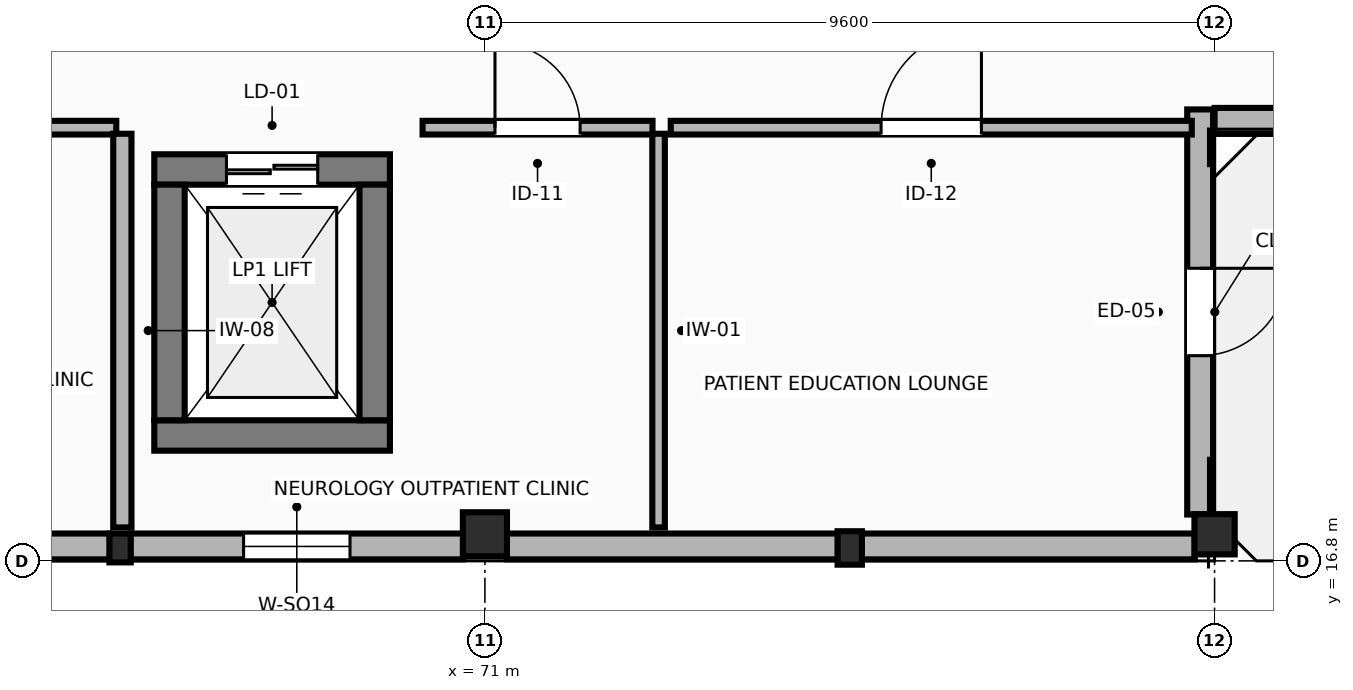
"""IFC4 building model, lengths in metres.
Left out: names, types, materials, properties, quantities, classifications, styles, units other than length and angle.
Written with IfcOpenShell. Run it as: python <this file> out.ifc"""

import sys

from ifc_helpers import new_model, si_unit, direction, frame, frame_2d, origin, origin_2d, place, context, subcontext, project, spatial, rectangle, extrude, element, fill, save


model = new_model("IFC4")
c1 = context("Model", 3, precision=1e-05, world=origin(), true_north=direction((0.0, 1.0)))
c2 = subcontext(c1, "Body", "Model", "MODEL_VIEW")
j1 = project(units=[si_unit("LENGTHUNIT", "METRE"), si_unit("PLANEANGLEUNIT", "RADIAN")], contexts=[c1])
p1 = place(None, origin())
s1 = spatial("IfcSite", under=j1, at=p1, CompositionType="ELEMENT")
p2 = place(p1, origin())
s2 = spatial("IfcBuilding", under=s1, at=p2, CompositionType="ELEMENT")
p3 = place(p2, frame((0.0, 0.0, 9.6)))
s3 = spatial("IfcBuildingStorey", under=s2, at=p3, CompositionType="ELEMENT", Elevation=9.6)
p4 = place(p3, frame((71.0, 17.15, 0.0), z_axis=(0.0, 0.0, 1.0), x_axis=(1.0, 0.0, 0.0)))
e1 = element("IfcColumn", 1, at=p4, inside=s3, PredefinedType="COLUMN", context=c2, shape_type="SweptSolid", body=[
    extrude(rectangle(XDim=0.58, YDim=0.58, at=origin_2d()), origin(), (0.0, 0.0, 1.0), 4.2),
])
p5 = place(p3, frame((80.6, 17.15, 0.0), z_axis=(0.0, 0.0, 1.0), x_axis=(1.0, 0.0, 0.0)))
e2 = element("IfcColumn", 2, at=p5, inside=s3, PredefinedType="COLUMN", context=c2, shape_type="SweptSolid", body=[
    extrude(rectangle(XDim=0.53, YDim=0.53, at=origin_2d()), origin(), (0.0, 0.0, 1.0), 4.2),
])
p6 = place(p3, frame((66.2, 16.97, 0.0), z_axis=(0.0, 0.0, 1.0), x_axis=(1.0, 0.0, 0.0)))
e3 = element("IfcColumn", 3, at=p6, inside=s3, PredefinedType="PILASTER", context=c2, shape_type="SweptSolid", body=[
    extrude(rectangle(XDim=0.28, YDim=0.38, at=origin_2d()), origin(), (0.0, 0.0, 1.0), 4.2),
])
p7 = place(p3, frame((75.8, 16.97, 0.0), z_axis=(0.0, 0.0, 1.0), x_axis=(1.0, 0.0, 0.0)))
e4 = element("IfcColumn", 4, at=p7, inside=s3, PredefinedType="PILASTER", context=c2, shape_type="SweptSolid", body=[
    extrude(rectangle(XDim=0.32, YDim=0.44, at=origin_2d()), origin(), (0.0, 0.0, 1.0), 4.2),
])
p8 = place(p3, frame((61.58, 16.99, 0.0), z_axis=(0.0, 0.0, 1.0), x_axis=(1.0, 0.0, 0.0)))
e5 = element("IfcWall", 5, at=p8, inside=s3, PredefinedType="STANDARD", context=c2, shape_type="SweptSolid", body=[
    extrude(rectangle(XDim=4.485, YDim=0.34, at=frame_2d((2.242, 0.0))), origin(), (0.0, 0.0, 1.0), 3.185),
])
p9 = place(p8, frame((1.643, 0.0, 1.15)))
e6 = element("IfcOpeningElement", 6, at=p9, cuts=e5, PredefinedType="OPENING", context=c2, shape_type="SweptSolid", body=[
    extrude(rectangle(XDim=1.2, YDim=1.2, at=frame_2d((0.6, 0.6))), frame((0.0, 0.18, 0.0), z_axis=(0.0, -1.0, 0.0), x_axis=(1.0, 0.0, 0.0)), (0.0, 0.0, 1.0), 0.36),
])
p10 = place(p3, frame((66.335, 16.99, 0.0), z_axis=(0.0, 0.0, 1.0), x_axis=(1.0, 0.0, 0.0)))
e7 = element("IfcWall", 7, at=p10, inside=s3, PredefinedType="STANDARD", context=c2, shape_type="SweptSolid", body=[
    extrude(rectangle(XDim=4.38, YDim=0.34, at=frame_2d((2.19, 0.0))), origin(), (0.0, 0.0, 1.0), 3.185),
])
p11 = place(p10, frame((1.49, 0.0, 1.15)))
e8 = element("IfcOpeningElement", 8, at=p11, cuts=e7, PredefinedType="OPENING", context=c2, shape_type="SweptSolid", body=[
    extrude(rectangle(XDim=1.4, YDim=1.4, at=frame_2d((0.7, 0.7))), frame((0.0, 0.18, 0.0), z_axis=(0.0, -1.0, 0.0), x_axis=(1.0, 0.0, 0.0)), (0.0, 0.0, 1.0), 0.36),
])
p12 = place(p3, frame((71.285, 16.99, 0.0), z_axis=(0.0, 0.0, 1.0), x_axis=(1.0, 0.0, 0.0)))
e9 = element("IfcWall", 9, at=p12, inside=s3, PredefinedType="STANDARD", context=c2, shape_type="SweptSolid", body=[
    extrude(rectangle(XDim=4.36, YDim=0.34, at=frame_2d((2.18, 0.0))), origin(), (0.0, 0.0, 1.0), 3.185),
])
p13 = place(p3, frame((75.955, 16.99, 0.0), z_axis=(0.0, 0.0, 1.0), x_axis=(1.0, 0.0, 0.0)))
e10 = element("IfcWall", 10, at=p13, inside=s3, PredefinedType="STANDARD", context=c2, shape_type="SweptSolid", body=[
    extrude(rectangle(XDim=4.385, YDim=0.34, at=frame_2d((2.192, 0.0))), origin(), (0.0, 0.0, 1.0), 3.185),
])
p14 = place(p3, frame((80.41, 17.41, 0.0), z_axis=(0.0, 0.0, 1.0), x_axis=(0.0, 1.0, 0.0)))
e11 = element("IfcWall", 11, at=p14, inside=s3, PredefinedType="STANDARD", context=c2, shape_type="SweptSolid", body=[
    extrude(rectangle(XDim=5.33, YDim=0.34, at=frame_2d((2.665, 0.0))), origin(), (0.0, 0.0, 1.0), 3.405),
])
p15 = place(p14, frame((2.09, 0.0, 0.0)))
e12 = element("IfcOpeningElement", 12, at=p15, cuts=e11, PredefinedType="OPENING", context=c2, shape_type="SweptSolid", body=[
    extrude(rectangle(XDim=1.15, YDim=2.2, at=frame_2d((0.575, 1.1))), frame((0.0, 0.18, 0.0), z_axis=(0.0, -1.0, 0.0), x_axis=(1.0, 0.0, 0.0)), (0.0, 0.0, 1.0), 0.36),
])
p16 = place(p3, frame((80.6, 22.59, 0.0), z_axis=(0.0, 0.0, 1.0), x_axis=(1.0, 0.0, 0.0)))
e13 = element("IfcWall", 13, at=p16, inside=s3, PredefinedType="STANDARD", context=c2, shape_type="SweptSolid", body=[
    extrude(rectangle(XDim=9.6, YDim=0.34, at=frame_2d((4.8, 0.0))), origin(), (0.0, 0.0, 1.0), 3.92),
])
p17 = place(p16, frame((2.105, 0.0, 0.95)))
e14 = element("IfcOpeningElement", 14, at=p17, cuts=e13, PredefinedType="OPENING", context=c2, shape_type="SweptSolid", body=[
    extrude(rectangle(XDim=1.55, YDim=1.45, at=frame_2d((0.775, 0.725))), frame((0.0, 0.18, 0.0), z_axis=(0.0, -1.0, 0.0), x_axis=(1.0, 0.0, 0.0)), (0.0, 0.0, 1.0), 0.36),
])
p18 = place(p16, frame((5.945, 0.0, 0.95)))
e15 = element("IfcOpeningElement", 15, at=p18, cuts=e13, PredefinedType="OPENING", context=c2, shape_type="SweptSolid", body=[
    extrude(rectangle(XDim=1.55, YDim=1.45, at=frame_2d((0.775, 0.725))), frame((0.0, 0.18, 0.0), z_axis=(0.0, -1.0, 0.0), x_axis=(1.0, 0.0, 0.0)), (0.0, 0.0, 1.0), 0.36),
])
p19 = place(p3, frame((66.65, 18.45, 0.0), z_axis=(0.0, 0.0, 1.0), x_axis=(1.0, 0.0, 0.0)))
e16 = element("IfcWall", 16, at=p19, inside=s3, PredefinedType="SHEAR", context=c2, shape_type="SweptSolid", body=[
    extrude(rectangle(XDim=3.1, YDim=0.4, at=frame_2d((1.55, 0.0))), origin(), (0.0, 0.0, 1.0), 4.2),
])
p20 = place(p3, frame((69.75, 21.95, 0.0), z_axis=(0.0, 0.0, 1.0), x_axis=(-1.0, 0.0, 0.0)))
e17 = element("IfcWall", 17, at=p20, inside=s3, PredefinedType="SHEAR", context=c2, shape_type="SweptSolid", body=[
    extrude(rectangle(XDim=3.1, YDim=0.4, at=frame_2d((1.55, 0.0))), origin(), (0.0, 0.0, 1.0), 4.2),
])
p21 = place(p20, frame((0.95, 0.0, 0.0)))
e18 = element("IfcOpeningElement", 18, at=p21, cuts=e17, PredefinedType="OPENING", context=c2, shape_type="SweptSolid", body=[
    extrude(rectangle(XDim=1.2, YDim=2.2, at=frame_2d((0.6, 1.1))), frame((0.0, 0.21, 0.0), z_axis=(0.0, -1.0, 0.0), x_axis=(1.0, 0.0, 0.0)), (0.0, 0.0, 1.0), 0.42),
])
for number, where, z_axis, x_axis in (
    (19, (66.85, 18.65, 0.0), (0.0, 0.0, 1.0), (0.0, 1.0, 0.0)),
    (20, (69.55, 21.75, 0.0), (0.0, 0.0, 1.0), (0.0, -1.0, 0.0)),
):
    element("IfcWall", number, at=place(p3, frame(where, z_axis=z_axis, x_axis=x_axis)), inside=s3, PredefinedType="SHEAR", context=c2, shape_type="SweptSolid", body=[
        extrude(rectangle(XDim=3.1, YDim=0.4, at=frame_2d((1.55, 0.0))), origin(), (0.0, 0.0, 1.0), 4.2),
    ])
p22 = place(p3, frame((59.335, 22.5, 0.0), z_axis=(0.0, 0.0, 1.0), x_axis=(1.0, 0.0, 0.0)))
e21 = element("IfcWall", 21, at=p22, inside=s3, PredefinedType="PARTITIONING", context=c2, shape_type="SweptSolid", body=[
    extrude(rectangle(XDim=6.815, YDim=0.18, at=frame_2d((3.407, 0.0))), origin(), (0.0, 0.0, 1.0), 3.92),
])
p23 = place(p22, frame((2.798, 0.0, 0.0)))
e22 = element("IfcOpeningElement", 22, at=p23, cuts=e21, PredefinedType="OPENING", context=c2, shape_type="SweptSolid", body=[
    extrude(rectangle(XDim=1.22, YDim=2.18, at=frame_2d((0.61, 1.09))), frame((0.0, 0.1, 0.0), z_axis=(0.0, -1.0, 0.0), x_axis=(1.0, 0.0, 0.0)), (0.0, 0.0, 1.0), 0.2),
])
p24 = place(p3, frame((66.23, 22.42, 0.0), z_axis=(0.0, 0.0, 1.0), x_axis=(0.0, -1.0, 0.0)))
e23 = element("IfcWall", 23, at=p24, inside=s3, PredefinedType="PARTITIONING", context=c2, shape_type="SweptSolid", body=[
    extrude(rectangle(XDim=5.18, YDim=0.24, at=frame_2d((2.59, 0.0))), origin(), (0.0, 0.0, 1.0), 3.92),
])
p25 = place(p3, frame((70.18, 22.5, 0.0), z_axis=(0.0, 0.0, 1.0), x_axis=(1.0, 0.0, 0.0)))
e24 = element("IfcWall", 24, at=p25, inside=s3, PredefinedType="PARTITIONING", context=c2, shape_type="SweptSolid", body=[
    extrude(rectangle(XDim=3.025, YDim=0.18, at=frame_2d((1.513, 0.0))), origin(), (0.0, 0.0, 1.0), 3.92),
])
p26 = place(p25, frame((0.952, 0.0, 0.0)))
e25 = element("IfcOpeningElement", 25, at=p26, cuts=e24, PredefinedType="OPENING", context=c2, shape_type="SweptSolid", body=[
    extrude(rectangle(XDim=1.12, YDim=2.16, at=frame_2d((0.56, 1.08))), frame((0.0, 0.1, 0.0), z_axis=(0.0, -1.0, 0.0), x_axis=(1.0, 0.0, 0.0)), (0.0, 0.0, 1.0), 0.2),
])
p27 = place(p3, frame((73.285, 22.42, 0.0), z_axis=(0.0, 0.0, 1.0), x_axis=(0.0, -1.0, 0.0)))
e26 = element("IfcWall", 26, at=p27, inside=s3, PredefinedType="PARTITIONING", context=c2, shape_type="SweptSolid", body=[
    extrude(rectangle(XDim=5.18, YDim=0.165, at=frame_2d((2.59, 0.0))), origin(), (0.0, 0.0, 1.0), 3.92),
])
p28 = place(p3, frame((73.445, 22.5, 0.0), z_axis=(0.0, 0.0, 1.0), x_axis=(1.0, 0.0, 0.0)))
e27 = element("IfcWall", 27, at=p28, inside=s3, PredefinedType="PARTITIONING", context=c2, shape_type="SweptSolid", body=[
    extrude(rectangle(XDim=6.855, YDim=0.18, at=frame_2d((3.427, 0.0))), origin(), (0.0, 0.0, 1.0), 3.92),
])
p29 = place(p28, frame((2.768, 0.0, 0.0)))
e28 = element("IfcOpeningElement", 28, at=p29, cuts=e27, PredefinedType="OPENING", context=c2, shape_type="SweptSolid", body=[
    extrude(rectangle(XDim=1.32, YDim=2.22, at=frame_2d((0.66, 1.11))), frame((0.0, 0.1, 0.0), z_axis=(0.0, -1.0, 0.0), x_axis=(1.0, 0.0, 0.0)), (0.0, 0.0, 1.0), 0.2),
])
p30 = place(p11, origin())
e29 = element("IfcWindow", 29, at=p30, inside=s3, PartitioningType="SINGLE_PANEL", PredefinedType="WINDOW", context=c2, shape_type="SweptSolid", body=[
    extrude(rectangle(XDim=1.4, YDim=1.4, at=frame_2d((0.7, 0.7))), frame((0.0, 0.03, 0.0), z_axis=(0.0, -1.0, 0.0), x_axis=(1.0, 0.0, 0.0)), (0.0, 0.0, 1.0), 0.06),
])
fill(e8, e29)
p31 = place(p15, frame((1.15, 0.0, 0.0), z_axis=(0.0, 0.0, 1.0), x_axis=(-1.0, 0.0, 0.0)))
e30 = element("IfcDoor", 30, at=p31, inside=s3, OperationType="SINGLE_SWING_LEFT", PredefinedType="DOOR", context=c2, shape_type="SweptSolid", body=[
    extrude(rectangle(XDim=1.15, YDim=2.2, at=frame_2d((0.575, 1.1))), frame((0.0, 0.025, 0.0), z_axis=(0.0, -1.0, 0.0), x_axis=(1.0, 0.0, 0.0)), (0.0, 0.0, 1.0), 0.05),
])
fill(e12, e30)
p32 = place(p21, origin())
e31 = element("IfcDoor", 31, at=p32, inside=s3, OperationType="DOUBLE_DOOR_SLIDING", PredefinedType="DOOR", context=c2, shape_type="SweptSolid", body=[
    extrude(rectangle(XDim=1.2, YDim=2.2, at=frame_2d((0.6, 1.1))), frame((0.0, 0.025, 0.0), z_axis=(0.0, -1.0, 0.0), x_axis=(1.0, 0.0, 0.0)), (0.0, 0.0, 1.0), 0.05),
])
fill(e18, e31)
p33 = place(p26, origin())
e32 = element("IfcDoor", 32, at=p33, inside=s3, OperationType="SINGLE_SWING_LEFT", PredefinedType="DOOR", context=c2, shape_type="SweptSolid", body=[
    extrude(rectangle(XDim=1.12, YDim=2.16, at=frame_2d((0.56, 1.08))), frame((0.0, 0.025, 0.0), z_axis=(0.0, -1.0, 0.0), x_axis=(1.0, 0.0, 0.0)), (0.0, 0.0, 1.0), 0.05),
])
fill(e25, e32)
p34 = place(p29, origin())
e33 = element("IfcDoor", 33, at=p34, inside=s3, OperationType="SINGLE_SWING_RIGHT", PredefinedType="DOOR", context=c2, shape_type="SweptSolid", body=[
    extrude(rectangle(XDim=1.32, YDim=2.22, at=frame_2d((0.66, 1.11))), frame((0.0, 0.025, 0.0), z_axis=(0.0, -1.0, 0.0), x_axis=(1.0, 0.0, 0.0)), (0.0, 0.0, 1.0), 0.05),
])
fill(e28, e33)
save(model, sys.argv[1])
